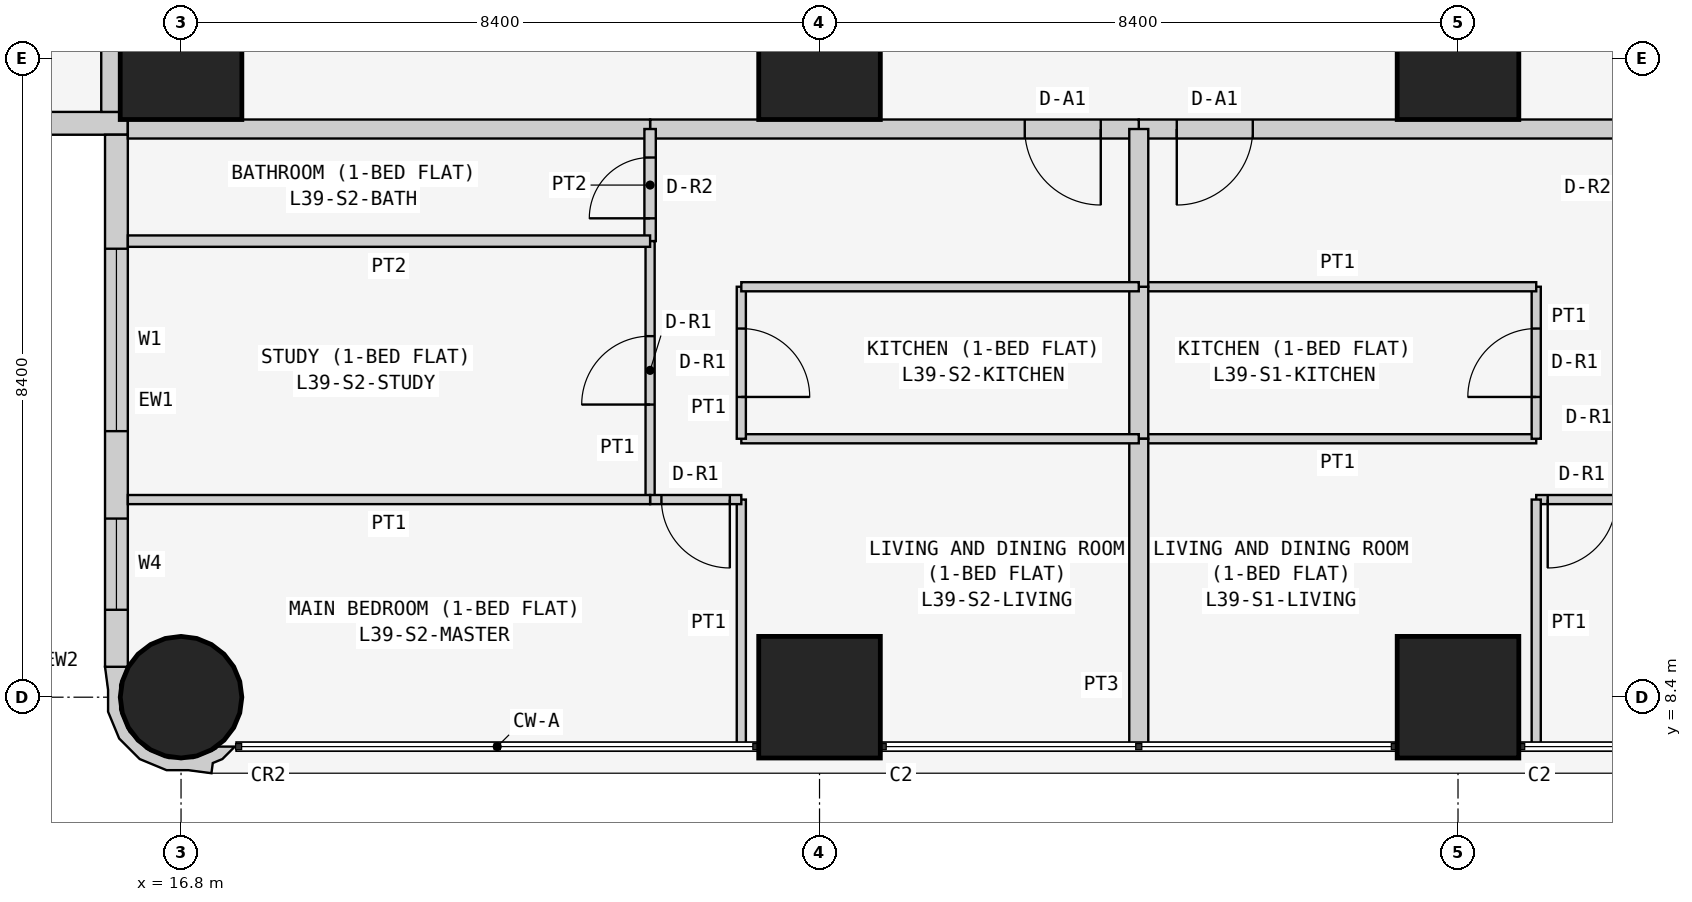
"""IFC4 building model, lengths in metres.
Left out: names, types, materials, properties, quantities, classifications, styles, units other than length and angle.
Written with IfcOpenShell. Run it as: python <this file> out.ifc"""

import sys

from ifc_helpers import new_model, si_unit, direction, frame, frame_2d, origin, origin_2d, place, context, subcontext, project, spatial, polyline, rectangle, circle, outline, extrude, element, fill, save


model = new_model("IFC4")
c1 = context("Model", 3, precision=1e-05, world=origin(), true_north=direction((0.0, 1.0)))
c2 = subcontext(c1, "Body", "Model", "MODEL_VIEW")
j1 = project(units=[si_unit("LENGTHUNIT", "METRE"), si_unit("PLANEANGLEUNIT", "RADIAN")], contexts=[c1])
p1 = place(None, origin())
s1 = spatial("IfcSite", under=j1, at=p1, CompositionType="ELEMENT")
p2 = place(p1, origin())
s2 = spatial("IfcBuilding", under=s1, at=p2, CompositionType="ELEMENT")
p3 = place(p2, frame((0.0, 0.0, 152.1)))
s3 = spatial("IfcBuildingStorey", under=s2, at=p3, CompositionType="ELEMENT", Elevation=152.1)
p4 = place(p3, frame((16.8, 8.4, 0.0), z_axis=(0.0, 0.0, 1.0), x_axis=(1.0, 0.0, 0.0)))
e1 = element("IfcColumn", 1, at=p4, inside=s3, PredefinedType="COLUMN", context=c2, shape_type="SweptSolid", body=[
    extrude(circle(Radius=0.8, at=origin_2d()), origin(), (0.0, 0.0, 1.0), 3.6),
])
for number, where, z_axis, x_axis in (
    (2, (16.8, 16.8, 0.0), (0.0, 0.0, 1.0), (1.0, 0.0, 0.0)),
    (3, (25.2, 8.4, 0.0), (0.0, 0.0, 1.0), (1.0, 0.0, 0.0)),
    (4, (25.2, 16.8, 0.0), (0.0, 0.0, 1.0), (1.0, 0.0, 0.0)),
    (5, (33.6, 8.4, 0.0), (0.0, 0.0, 1.0), (1.0, 0.0, 0.0)),
    (6, (33.6, 16.8, 0.0), (0.0, 0.0, 1.0), (1.0, 0.0, 0.0)),
):
    element("IfcColumn", number, at=place(p3, frame(where, z_axis=z_axis, x_axis=x_axis)), inside=s3, PredefinedType="COLUMN", context=c2, shape_type="SweptSolid", body=[
        extrude(rectangle(XDim=1.6, YDim=1.6, at=origin_2d()), origin(), (0.0, 0.0, 1.0), 3.6),
    ])
p5 = place(p3, frame((0.4, 15.95, 0.0), z_axis=(0.0, 0.0, 1.0), x_axis=(1.0, 0.0, 0.0)))
e7 = element("IfcWall", 7, at=p5, inside=s3, PredefinedType="SOLIDWALL", context=c2, shape_type="SweptSolid", body=[
    extrude(rectangle(XDim=15.7, YDim=0.3, at=frame_2d((7.85, 0.0))), origin(), (0.0, 0.0, 1.0), 3.45),
])
p6 = place(p5, frame((12.4, 0.0, 0.9)))
e8 = element("IfcOpeningElement", 8, at=p6, cuts=e7, PredefinedType="OPENING", context=c2, shape_type="SweptSolid", body=[
    extrude(rectangle(XDim=1.8, YDim=1.5, at=frame_2d((0.9, 0.75))), frame((0.0, 0.16, 0.0), z_axis=(0.0, -1.0, 0.0), x_axis=(1.0, 0.0, 0.0)), (0.0, 0.0, 1.0), 0.32),
])
p7 = place(p5, frame((9.55, 0.0, 1.5)))
e9 = element("IfcOpeningElement", 9, at=p7, cuts=e7, PredefinedType="OPENING", context=c2, shape_type="SweptSolid", body=[
    extrude(rectangle(XDim=0.9, YDim=0.7, at=frame_2d((0.45, 0.35))), frame((0.0, 0.16, 0.0), z_axis=(0.0, -1.0, 0.0), x_axis=(1.0, 0.0, 0.0)), (0.0, 0.0, 1.0), 0.32),
])
p8 = place(p5, frame((5.1, 0.0, 0.9)))
e10 = element("IfcOpeningElement", 10, at=p8, cuts=e7, PredefinedType="OPENING", context=c2, shape_type="SweptSolid", body=[
    extrude(rectangle(XDim=1.8, YDim=1.5, at=frame_2d((0.9, 0.75))), frame((0.0, 0.16, 0.0), z_axis=(0.0, -1.0, 0.0), x_axis=(1.0, 0.0, 0.0)), (0.0, 0.0, 1.0), 0.32),
])
p9 = place(p5, frame((2.0, 0.0, 0.0)))
e11 = element("IfcOpeningElement", 11, at=p9, cuts=e7, PredefinedType="OPENING", context=c2, shape_type="SweptSolid", body=[
    extrude(rectangle(XDim=0.9, YDim=2.4, at=frame_2d((0.45, 1.2))), frame((0.0, 0.16, 0.0), z_axis=(0.0, -1.0, 0.0), x_axis=(1.0, 0.0, 0.0)), (0.0, 0.0, 1.0), 0.32),
])
p10 = place(p5, frame((0.7, 0.0, 0.9)))
e12 = element("IfcOpeningElement", 12, at=p10, cuts=e7, PredefinedType="OPENING", context=c2, shape_type="SweptSolid", body=[
    extrude(rectangle(XDim=1.2, YDim=1.5, at=frame_2d((0.6, 0.75))), frame((0.0, 0.16, 0.0), z_axis=(0.0, -1.0, 0.0), x_axis=(1.0, 0.0, 0.0)), (0.0, 0.0, 1.0), 0.32),
])
p11 = place(p3, frame((15.95, 15.8, 0.0), z_axis=(0.0, 0.0, 1.0), x_axis=(0.0, -1.0, 0.0)))
e13 = element("IfcWall", 13, at=p11, inside=s3, PredefinedType="SOLIDWALL", context=c2, shape_type="SweptSolid", body=[
    extrude(rectangle(XDim=7.0, YDim=0.3, at=frame_2d((3.5, 0.0))), origin(), (0.0, 0.0, 1.0), 3.45),
])
p12 = place(p11, frame((1.5, 0.0, 0.9)))
e14 = element("IfcOpeningElement", 14, at=p12, cuts=e13, PredefinedType="OPENING", context=c2, shape_type="SweptSolid", body=[
    extrude(rectangle(XDim=2.4, YDim=1.5, at=frame_2d((1.2, 0.75))), frame((0.0, 0.16, 0.0), z_axis=(0.0, -1.0, 0.0), x_axis=(1.0, 0.0, 0.0)), (0.0, 0.0, 1.0), 0.32),
])
p13 = place(p11, frame((5.05, 0.0, 0.9)))
e15 = element("IfcOpeningElement", 15, at=p13, cuts=e13, PredefinedType="OPENING", context=c2, shape_type="SweptSolid", body=[
    extrude(rectangle(XDim=1.2, YDim=1.5, at=frame_2d((0.6, 0.75))), frame((0.0, 0.16, 0.0), z_axis=(0.0, -1.0, 0.0), x_axis=(1.0, 0.0, 0.0)), (0.0, 0.0, 1.0), 0.32),
])
p14 = place(p3, frame((15.983, 8.727, 0.0), z_axis=(0.0, 0.0, 1.0), x_axis=(-0.343276641956, -0.93923434088, 0.0)))
e16 = element("IfcWall", 16, at=p14, inside=s3, PredefinedType="SOLIDWALL", context=c2, shape_type="SweptSolid", body=[
    extrude(outline(polyline([(0.829, 1.599), (0.697, 1.569), (0.604, 1.67), (0.394, 1.767), (0.471, 1.556), (0.509, 1.539), (0.724, 1.304), (0.833, 1.005), (0.82, 0.686), (0.686, 0.397), (0.451, 0.182), (0.152, 0.073), (-0.116, 0.084), (-0.127, 0.078), (-0.146, 0.071), (-0.006, -0.197), (0.266, -0.055), (0.535, 0.044), (0.817, 0.302), (0.978, 0.648), (0.994, 1.03), (0.895, 1.3), (0.829, 1.599)])), origin(), (0.0, 0.0, 1.0), 3.45),
])
p15 = place(p3, frame((35.829, 15.875, 0.0), z_axis=(0.0, 0.0, 1.0), x_axis=(-1.0, 0.0, 0.0)))
e17 = element("IfcWall", 17, at=p15, inside=s3, PredefinedType="PARTITIONING", context=c2, shape_type="SweptSolid", body=[
    extrude(rectangle(XDim=6.429, YDim=0.25, at=frame_2d((3.215, 0.0))), origin(), (0.0, 0.0, 1.0), 3.45),
])
p16 = place(p15, frame((4.929, 0.0, 0.0)))
e18 = element("IfcOpeningElement", 18, at=p16, cuts=e17, PredefinedType="OPENING", context=c2, shape_type="SweptSolid", body=[
    extrude(rectangle(XDim=1.0, YDim=2.1, at=frame_2d((0.5, 1.05))), frame((0.0, 0.135, 0.0), z_axis=(0.0, -1.0, 0.0), x_axis=(1.0, 0.0, 0.0)), (0.0, 0.0, 1.0), 0.27),
])
p17 = place(p3, frame((29.4, 15.875, 0.0), z_axis=(0.0, 0.0, 1.0), x_axis=(-1.0, 0.0, 0.0)))
e19 = element("IfcWall", 19, at=p17, inside=s3, PredefinedType="PARTITIONING", context=c2, shape_type="SweptSolid", body=[
    extrude(rectangle(XDim=6.429, YDim=0.25, at=frame_2d((3.214, 0.0))), origin(), (0.0, 0.0, 1.0), 3.45),
])
p18 = place(p17, frame((0.5, 0.0, 0.0)))
e20 = element("IfcOpeningElement", 20, at=p18, cuts=e19, PredefinedType="OPENING", context=c2, shape_type="SweptSolid", body=[
    extrude(rectangle(XDim=1.0, YDim=2.1, at=frame_2d((0.5, 1.05))), frame((0.0, 0.135, 0.0), z_axis=(0.0, -1.0, 0.0), x_axis=(1.0, 0.0, 0.0)), (0.0, 0.0, 1.0), 0.27),
])
for number, where, z_axis, x_axis in (
    (21, (22.971, 15.875, 0.0), (0.0, 0.0, 1.0), (-1.0, 0.0, 0.0)),
    (22, (15.875, 16.1, 0.0), (0.0, 0.0, 1.0), (0.0, 1.0, 0.0)),
):
    element("IfcWall", number, at=place(p3, frame(where, z_axis=z_axis, x_axis=x_axis)), inside=s3, PredefinedType="PARTITIONING", context=c2, shape_type="SweptSolid", body=[
        extrude(rectangle(XDim=6.871, YDim=0.25, at=frame_2d((3.436, 0.0))), origin(), (0.0, 0.0, 1.0), 3.45),
    ])
p19 = place(p3, frame((29.4, 11.8, 0.0), z_axis=(0.0, 0.0, 1.0), x_axis=(1.0, 0.0, 0.0)))
e23 = element("IfcWall", 23, at=p19, inside=s3, PredefinedType="PARTITIONING", context=c2, shape_type="SweptSolid", body=[
    extrude(rectangle(XDim=5.229, YDim=0.12, at=frame_2d((2.615, 0.0))), origin(), (0.0, 0.0, 1.0), 3.45),
])
p20 = place(p3, frame((34.629, 11.8, 0.0), z_axis=(0.0, 0.0, 1.0), x_axis=(0.0, 1.0, 0.0)))
e24 = element("IfcWall", 24, at=p20, inside=s3, PredefinedType="PARTITIONING", context=c2, shape_type="SweptSolid", body=[
    extrude(rectangle(XDim=2.0, YDim=0.12, at=frame_2d((1.0, 0.0))), origin(), (0.0, 0.0, 1.0), 3.45),
])
p21 = place(p20, frame((0.55, 0.0, 0.0)))
e25 = element("IfcOpeningElement", 25, at=p21, cuts=e24, PredefinedType="OPENING", context=c2, shape_type="SweptSolid", body=[
    extrude(rectangle(XDim=0.9, YDim=2.1, at=frame_2d((0.45, 1.05))), frame((0.0, 0.07, 0.0), z_axis=(0.0, -1.0, 0.0), x_axis=(1.0, 0.0, 0.0)), (0.0, 0.0, 1.0), 0.14),
])
p22 = place(p3, frame((34.629, 13.8, 0.0), z_axis=(0.0, 0.0, 1.0), x_axis=(-1.0, 0.0, 0.0)))
e26 = element("IfcWall", 26, at=p22, inside=s3, PredefinedType="PARTITIONING", context=c2, shape_type="SweptSolid", body=[
    extrude(rectangle(XDim=5.229, YDim=0.12, at=frame_2d((2.615, 0.0))), origin(), (0.0, 0.0, 1.0), 3.45),
])
p23 = place(p3, frame((29.4, 13.8, 0.0), z_axis=(0.0, 0.0, 1.0), x_axis=(0.0, -1.0, 0.0)))
e27 = element("IfcWall", 27, at=p23, inside=s3, PredefinedType="PARTITIONING", context=c2, shape_type="SweptSolid", body=[
    extrude(rectangle(XDim=2.0, YDim=0.25, at=frame_2d((1.0, 0.0))), origin(), (0.0, 0.0, 1.0), 2.848),
])
p24 = place(p3, frame((35.829, 11.0, 0.0), z_axis=(0.0, 0.0, 1.0), x_axis=(-1.0, 0.0, 0.0)))
e28 = element("IfcWall", 28, at=p24, inside=s3, PredefinedType="PARTITIONING", context=c2, shape_type="SweptSolid", body=[
    extrude(rectangle(XDim=1.2, YDim=0.12, at=frame_2d((0.6, 0.0))), origin(), (0.0, 0.0, 1.0), 3.45),
])
p25 = place(p24, frame((0.149, 0.0, 0.0)))
e29 = element("IfcOpeningElement", 29, at=p25, cuts=e28, PredefinedType="OPENING", context=c2, shape_type="SweptSolid", body=[
    extrude(rectangle(XDim=0.9, YDim=2.1, at=frame_2d((0.45, 1.05))), frame((0.0, 0.07, 0.0), z_axis=(0.0, -1.0, 0.0), x_axis=(1.0, 0.0, 0.0)), (0.0, 0.0, 1.0), 0.14),
])
p26 = place(p3, frame((34.629, 11.0, 0.0), z_axis=(0.0, 0.0, 1.0), x_axis=(0.0, -1.0, 0.0)))
e30 = element("IfcWall", 30, at=p26, inside=s3, PredefinedType="PARTITIONING", context=c2, shape_type="SweptSolid", body=[
    extrude(rectangle(XDim=3.25, YDim=0.12, at=frame_2d((1.625, 0.0))), origin(), (0.0, 0.0, 1.0), 3.45),
])
p27 = place(p3, frame((29.4, 7.75, 0.0), z_axis=(0.0, 0.0, 1.0), x_axis=(0.0, 1.0, 0.0)))
e31 = element("IfcWall", 31, at=p27, inside=s3, PredefinedType="PARTITIONING", context=c2, shape_type="SweptSolid", body=[
    extrude(rectangle(XDim=4.05, YDim=0.25, at=frame_2d((2.025, 0.0))), origin(), (0.0, 0.0, 1.0), 2.848),
])
p28 = place(p3, frame((29.4, 13.8, 0.0), z_axis=(0.0, 0.0, 1.0), x_axis=(0.0, 1.0, 0.0)))
e32 = element("IfcWall", 32, at=p28, inside=s3, PredefinedType="PARTITIONING", context=c2, shape_type="SweptSolid", body=[
    extrude(rectangle(XDim=2.075, YDim=0.25, at=frame_2d((1.038, 0.0))), origin(), (0.0, 0.0, 1.0), 2.848),
])
p29 = place(p3, frame((29.4, 11.8, 0.0), z_axis=(0.0, 0.0, 1.0), x_axis=(-1.0, 0.0, 0.0)))
e33 = element("IfcWall", 33, at=p29, inside=s3, PredefinedType="PARTITIONING", context=c2, shape_type="SweptSolid", body=[
    extrude(rectangle(XDim=5.229, YDim=0.12, at=frame_2d((2.615, 0.0))), origin(), (0.0, 0.0, 1.0), 3.45),
])
p30 = place(p3, frame((24.171, 11.8, 0.0), z_axis=(0.0, 0.0, 1.0), x_axis=(0.0, 1.0, 0.0)))
e34 = element("IfcWall", 34, at=p30, inside=s3, PredefinedType="PARTITIONING", context=c2, shape_type="SweptSolid", body=[
    extrude(rectangle(XDim=2.0, YDim=0.12, at=frame_2d((1.0, 0.0))), origin(), (0.0, 0.0, 1.0), 3.45),
])
p31 = place(p30, frame((0.55, 0.0, 0.0)))
e35 = element("IfcOpeningElement", 35, at=p31, cuts=e34, PredefinedType="OPENING", context=c2, shape_type="SweptSolid", body=[
    extrude(rectangle(XDim=0.9, YDim=2.1, at=frame_2d((0.45, 1.05))), frame((0.0, 0.07, 0.0), z_axis=(0.0, -1.0, 0.0), x_axis=(1.0, 0.0, 0.0)), (0.0, 0.0, 1.0), 0.14),
])
p32 = place(p3, frame((24.171, 13.8, 0.0), z_axis=(0.0, 0.0, 1.0), x_axis=(1.0, 0.0, 0.0)))
e36 = element("IfcWall", 36, at=p32, inside=s3, PredefinedType="PARTITIONING", context=c2, shape_type="SweptSolid", body=[
    extrude(rectangle(XDim=5.229, YDim=0.12, at=frame_2d((2.615, 0.0))), origin(), (0.0, 0.0, 1.0), 3.45),
])
p33 = place(p3, frame((22.971, 14.4, 0.0), z_axis=(0.0, 0.0, 1.0), x_axis=(0.0, 1.0, 0.0)))
e37 = element("IfcWall", 37, at=p33, inside=s3, PredefinedType="PARTITIONING", context=c2, shape_type="SweptSolid", body=[
    extrude(rectangle(XDim=1.475, YDim=0.15, at=frame_2d((0.738, 0.0))), origin(), (0.0, 0.0, 1.0), 3.45),
])
p34 = place(p33, frame((0.3, 0.0, 0.0)))
e38 = element("IfcOpeningElement", 38, at=p34, cuts=e37, PredefinedType="OPENING", context=c2, shape_type="SweptSolid", body=[
    extrude(rectangle(XDim=0.8, YDim=2.1, at=frame_2d((0.4, 1.05))), frame((0.0, 0.085, 0.0), z_axis=(0.0, -1.0, 0.0), x_axis=(1.0, 0.0, 0.0)), (0.0, 0.0, 1.0), 0.17),
])
p35 = place(p3, frame((22.971, 11.0, 0.0), z_axis=(0.0, 0.0, 1.0), x_axis=(0.0, 1.0, 0.0)))
e39 = element("IfcWall", 39, at=p35, inside=s3, PredefinedType="PARTITIONING", context=c2, shape_type="SweptSolid", body=[
    extrude(rectangle(XDim=3.4, YDim=0.12, at=frame_2d((1.7, 0.0))), origin(), (0.0, 0.0, 1.0), 3.45),
])
p36 = place(p35, frame((1.25, 0.0, 0.0)))
e40 = element("IfcOpeningElement", 40, at=p36, cuts=e39, PredefinedType="OPENING", context=c2, shape_type="SweptSolid", body=[
    extrude(rectangle(XDim=0.9, YDim=2.1, at=frame_2d((0.45, 1.05))), frame((0.0, 0.07, 0.0), z_axis=(0.0, -1.0, 0.0), x_axis=(1.0, 0.0, 0.0)), (0.0, 0.0, 1.0), 0.14),
])
p37 = place(p3, frame((24.171, 7.75, 0.0), z_axis=(0.0, 0.0, 1.0), x_axis=(0.0, 1.0, 0.0)))
e41 = element("IfcWall", 41, at=p37, inside=s3, PredefinedType="PARTITIONING", context=c2, shape_type="SweptSolid", body=[
    extrude(rectangle(XDim=3.25, YDim=0.12, at=frame_2d((1.625, 0.0))), origin(), (0.0, 0.0, 1.0), 3.45),
])
p38 = place(p3, frame((24.171, 11.0, 0.0), z_axis=(0.0, 0.0, 1.0), x_axis=(-1.0, 0.0, 0.0)))
e42 = element("IfcWall", 42, at=p38, inside=s3, PredefinedType="PARTITIONING", context=c2, shape_type="SweptSolid", body=[
    extrude(rectangle(XDim=1.2, YDim=0.12, at=frame_2d((0.6, 0.0))), origin(), (0.0, 0.0, 1.0), 3.45),
])
p39 = place(p38, frame((0.151, 0.0, 0.0)))
e43 = element("IfcOpeningElement", 43, at=p39, cuts=e42, PredefinedType="OPENING", context=c2, shape_type="SweptSolid", body=[
    extrude(rectangle(XDim=0.9, YDim=2.1, at=frame_2d((0.45, 1.05))), frame((0.0, 0.07, 0.0), z_axis=(0.0, -1.0, 0.0), x_axis=(1.0, 0.0, 0.0)), (0.0, 0.0, 1.0), 0.14),
])
p40 = place(p3, frame((22.971, 14.4, 0.0), z_axis=(0.0, 0.0, 1.0), x_axis=(-1.0, 0.0, 0.0)))
e44 = element("IfcWall", 44, at=p40, inside=s3, PredefinedType="PARTITIONING", context=c2, shape_type="SweptSolid", body=[
    extrude(rectangle(XDim=6.871, YDim=0.15, at=frame_2d((3.436, 0.0))), origin(), (0.0, 0.0, 1.0), 3.45),
])
p41 = place(p3, frame((22.971, 11.0, 0.0), z_axis=(0.0, 0.0, 1.0), x_axis=(-1.0, 0.0, 0.0)))
e45 = element("IfcWall", 45, at=p41, inside=s3, PredefinedType="PARTITIONING", context=c2, shape_type="SweptSolid", body=[
    extrude(rectangle(XDim=6.871, YDim=0.12, at=frame_2d((3.436, 0.0))), origin(), (0.0, 0.0, 1.0), 3.45),
])
p42 = place(p12, origin())
e46 = element("IfcWindow", 46, at=p42, inside=s3, PartitioningType="SINGLE_PANEL", PredefinedType="WINDOW", context=c2, shape_type="SweptSolid", body=[
    extrude(rectangle(XDim=2.4, YDim=1.5, at=frame_2d((1.2, 0.75))), frame((0.0, 0.03, 0.0), z_axis=(0.0, -1.0, 0.0), x_axis=(1.0, 0.0, 0.0)), (0.0, 0.0, 1.0), 0.06),
])
fill(e14, e46)
p43 = place(p13, origin())
e47 = element("IfcWindow", 47, at=p43, inside=s3, PartitioningType="SINGLE_PANEL", PredefinedType="WINDOW", context=c2, shape_type="SweptSolid", body=[
    extrude(rectangle(XDim=1.2, YDim=1.5, at=frame_2d((0.6, 0.75))), frame((0.0, 0.03, 0.0), z_axis=(0.0, -1.0, 0.0), x_axis=(1.0, 0.0, 0.0)), (0.0, 0.0, 1.0), 0.06),
])
fill(e15, e47)
p44 = place(p16, origin())
e48 = element("IfcDoor", 48, at=p44, inside=s3, OperationType="SINGLE_SWING_RIGHT", PredefinedType="DOOR", context=c2, shape_type="SweptSolid", body=[
    extrude(rectangle(XDim=1.0, YDim=2.1, at=frame_2d((0.5, 1.05))), frame((0.0, 0.025, 0.0), z_axis=(0.0, -1.0, 0.0), x_axis=(1.0, 0.0, 0.0)), (0.0, 0.0, 1.0), 0.05),
])
fill(e18, e48)
p45 = place(p21, origin())
e49 = element("IfcDoor", 49, at=p45, inside=s3, OperationType="SINGLE_SWING_LEFT", PredefinedType="DOOR", context=c2, shape_type="SweptSolid", body=[
    extrude(rectangle(XDim=0.9, YDim=2.1, at=frame_2d((0.45, 1.05))), frame((0.0, 0.025, 0.0), z_axis=(0.0, -1.0, 0.0), x_axis=(1.0, 0.0, 0.0)), (0.0, 0.0, 1.0), 0.05),
])
fill(e25, e49)
p46 = place(p25, origin())
e50 = element("IfcDoor", 50, at=p46, inside=s3, OperationType="SINGLE_SWING_RIGHT", PredefinedType="DOOR", context=c2, shape_type="SweptSolid", body=[
    extrude(rectangle(XDim=0.9, YDim=2.1, at=frame_2d((0.45, 1.05))), frame((0.0, 0.025, 0.0), z_axis=(0.0, -1.0, 0.0), x_axis=(1.0, 0.0, 0.0)), (0.0, 0.0, 1.0), 0.05),
])
fill(e29, e50)
p47 = place(p18, origin())
e51 = element("IfcDoor", 51, at=p47, inside=s3, OperationType="SINGLE_SWING_LEFT", PredefinedType="DOOR", context=c2, shape_type="SweptSolid", body=[
    extrude(rectangle(XDim=1.0, YDim=2.1, at=frame_2d((0.5, 1.05))), frame((0.0, 0.025, 0.0), z_axis=(0.0, -1.0, 0.0), x_axis=(1.0, 0.0, 0.0)), (0.0, 0.0, 1.0), 0.05),
])
fill(e20, e51)
p48 = place(p31, frame((0.9, 0.0, 0.0), z_axis=(0.0, 0.0, 1.0), x_axis=(-1.0, 0.0, 0.0)))
e52 = element("IfcDoor", 52, at=p48, inside=s3, OperationType="SINGLE_SWING_RIGHT", PredefinedType="DOOR", context=c2, shape_type="SweptSolid", body=[
    extrude(rectangle(XDim=0.9, YDim=2.1, at=frame_2d((0.45, 1.05))), frame((0.0, 0.025, 0.0), z_axis=(0.0, -1.0, 0.0), x_axis=(1.0, 0.0, 0.0)), (0.0, 0.0, 1.0), 0.05),
])
fill(e35, e52)
p49 = place(p34, origin())
e53 = element("IfcDoor", 53, at=p49, inside=s3, OperationType="SINGLE_SWING_LEFT", PredefinedType="DOOR", context=c2, shape_type="SweptSolid", body=[
    extrude(rectangle(XDim=0.8, YDim=2.1, at=frame_2d((0.4, 1.05))), frame((0.0, 0.025, 0.0), z_axis=(0.0, -1.0, 0.0), x_axis=(1.0, 0.0, 0.0)), (0.0, 0.0, 1.0), 0.05),
])
fill(e38, e53)
p50 = place(p36, origin())
e54 = element("IfcDoor", 54, at=p50, inside=s3, OperationType="SINGLE_SWING_LEFT", PredefinedType="DOOR", context=c2, shape_type="SweptSolid", body=[
    extrude(rectangle(XDim=0.9, YDim=2.1, at=frame_2d((0.45, 1.05))), frame((0.0, 0.025, 0.0), z_axis=(0.0, -1.0, 0.0), x_axis=(1.0, 0.0, 0.0)), (0.0, 0.0, 1.0), 0.05),
])
fill(e40, e54)
p51 = place(p39, origin())
e55 = element("IfcDoor", 55, at=p51, inside=s3, OperationType="SINGLE_SWING_LEFT", PredefinedType="DOOR", context=c2, shape_type="SweptSolid", body=[
    extrude(rectangle(XDim=0.9, YDim=2.1, at=frame_2d((0.45, 1.05))), frame((0.0, 0.025, 0.0), z_axis=(0.0, -1.0, 0.0), x_axis=(1.0, 0.0, 0.0)), (0.0, 0.0, 1.0), 0.05),
])
fill(e43, e55)
save(model, sys.argv[1])
